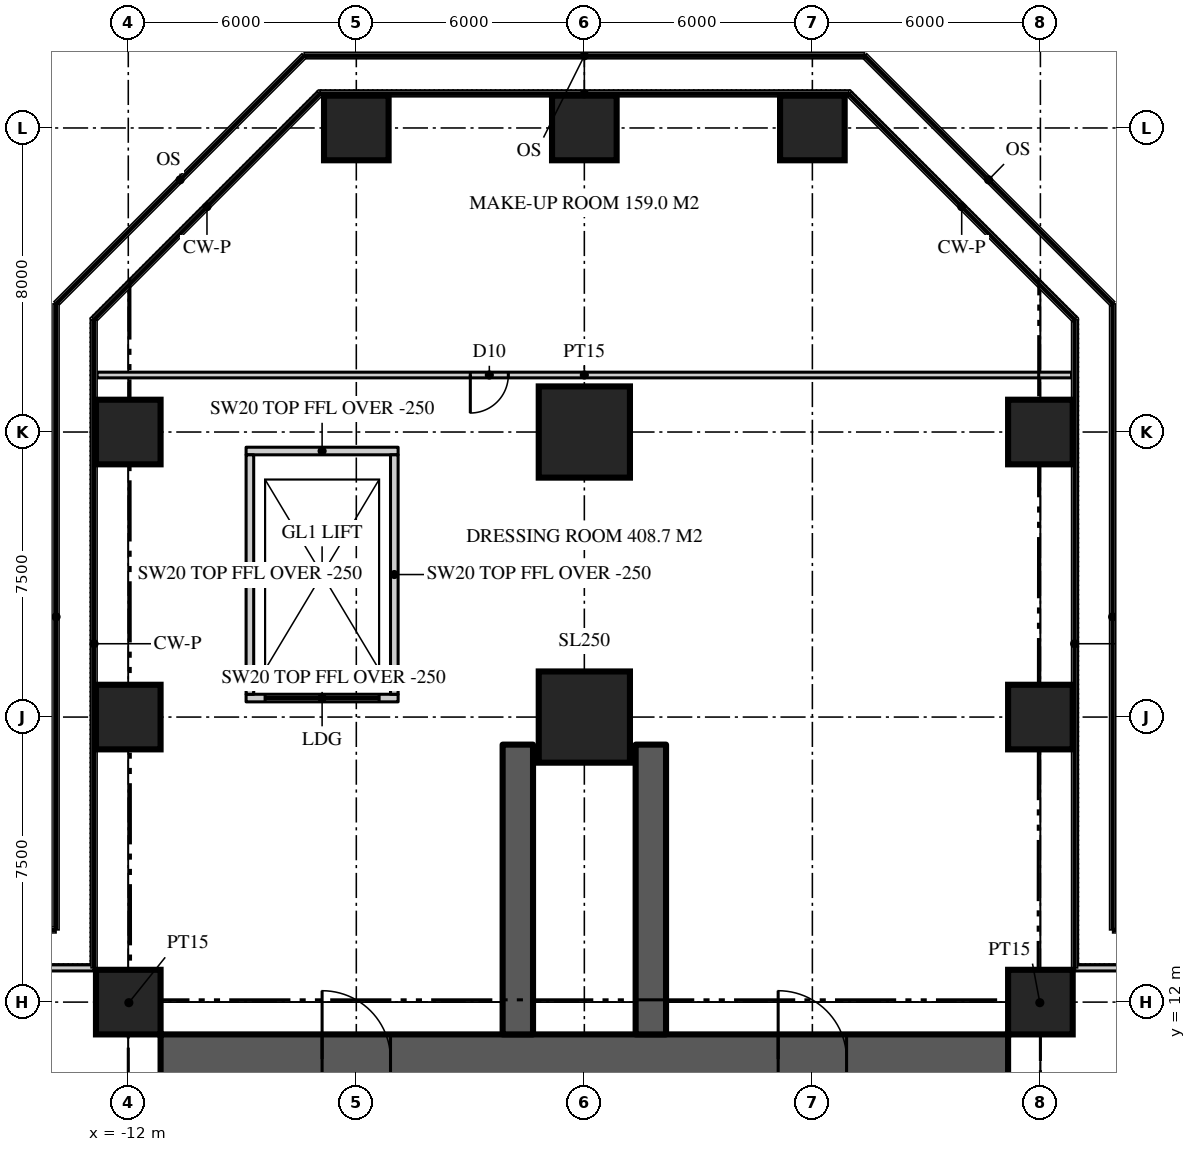
"""IFC4 building model, lengths in metres.
Left out: names, types, materials, properties, quantities, classifications, styles, units other than length and angle.
Written with IfcOpenShell. Run it as: python <this file> out.ifc"""

import sys

from ifc_helpers import new_model, si_unit, direction, frame, frame_2d, origin, origin_2d, place, context, subcontext, project, spatial, rectangle, extrude, element, fill, save


model = new_model("IFC4")
c1 = context("Model", 3, precision=1e-05, world=origin(), true_north=direction((0.0, 1.0)))
c2 = subcontext(c1, "Body", "Model", "MODEL_VIEW")
j1 = project(units=[si_unit("LENGTHUNIT", "METRE"), si_unit("PLANEANGLEUNIT", "RADIAN")], contexts=[c1])
p1 = place(None, origin())
s1 = spatial("IfcSite", under=j1, at=p1, CompositionType="ELEMENT")
p2 = place(p1, origin())
s2 = spatial("IfcBuilding", under=s1, at=p2, CompositionType="ELEMENT")
p3 = place(p2, frame((0.0, 0.0, 15.0)))
s3 = spatial("IfcBuildingStorey", under=s2, at=p3, CompositionType="ELEMENT", Elevation=15.0)
p4 = place(p3, frame((-11.15, 10.5, 0.0), z_axis=(0.0, 0.0, 1.0), x_axis=(1.0, 0.0, 0.0)))
e1 = element("IfcWall", 1, at=p4, inside=s3, PredefinedType="SHEAR", context=c2, shape_type="SweptSolid", body=[
    extrude(rectangle(XDim=22.3, YDim=1.3, at=frame_2d((11.15, 0.0))), origin(), (0.0, 0.0, 1.0), 8.0),
])
p5 = place(p4, frame((4.25, 0.0, 0.0)))
e2 = element("IfcOpeningElement", 2, at=p5, cuts=e1, PredefinedType="OPENING", context=c2, shape_type="SweptSolid", body=[
    extrude(rectangle(XDim=1.8, YDim=2.2, at=frame_2d((0.9, 1.1))), frame((0.0, 0.66, 0.0), z_axis=(0.0, -1.0, 0.0), x_axis=(1.0, 0.0, 0.0)), (0.0, 0.0, 1.0), 1.32),
])
p6 = place(p4, frame((16.25, 0.0, 0.0)))
e3 = element("IfcOpeningElement", 3, at=p6, cuts=e1, PredefinedType="OPENING", context=c2, shape_type="SweptSolid", body=[
    extrude(rectangle(XDim=1.8, YDim=2.2, at=frame_2d((0.9, 1.1))), frame((0.0, 0.66, 0.0), z_axis=(0.0, -1.0, 0.0), x_axis=(1.0, 0.0, 0.0)), (0.0, 0.0, 1.0), 1.32),
])
for number, where, z_axis, x_axis in (
    (4, (1.75, 11.15, 0.0), (0.0, 0.0, 1.0), (0.0, 1.0, 0.0)),
    (5, (-1.75, 11.15, 0.0), (0.0, 0.0, 1.0), (0.0, 1.0, 0.0)),
):
    element("IfcWall", number, at=place(p3, frame(where, z_axis=z_axis, x_axis=x_axis)), inside=s3, PredefinedType="SHEAR", context=c2, shape_type="SweptSolid", body=[
        extrude(rectangle(XDim=7.625, YDim=0.8, at=frame_2d((3.812, 0.0))), origin(), (0.0, 0.0, 1.0), 8.0),
    ])
for number, where, z_axis, x_axis in (
    (6, (-12.0, 12.0, 0.0), (0.0, 0.0, 1.0), (1.0, 0.0, 0.0)),
    (7, (12.0, 12.0, 0.0), (0.0, 0.0, 1.0), (1.0, 0.0, 0.0)),
    (8, (-12.0, 19.5, 0.0), (0.0, 0.0, 1.0), (1.0, 0.0, 0.0)),
):
    element("IfcColumn", number, at=place(p3, frame(where, z_axis=z_axis, x_axis=x_axis)), inside=s3, PredefinedType="COLUMN", context=c2, shape_type="SweptSolid", body=[
        extrude(rectangle(XDim=1.7, YDim=1.7, at=origin_2d()), origin(), (0.0, 0.0, 1.0), 8.0),
    ])
p7 = place(p3, frame((0.0, 19.5, 0.0), z_axis=(0.0, 0.0, 1.0), x_axis=(1.0, 0.0, 0.0)))
e9 = element("IfcColumn", 9, at=p7, inside=s3, PredefinedType="COLUMN", context=c2, shape_type="SweptSolid", body=[
    extrude(rectangle(XDim=2.4, YDim=2.4, at=origin_2d()), origin(), (0.0, 0.0, 1.0), 8.0),
])
for number, where, z_axis, x_axis in (
    (10, (12.0, 19.5, 0.0), (0.0, 0.0, 1.0), (1.0, 0.0, 0.0)),
    (11, (-12.0, 27.0, 0.0), (0.0, 0.0, 1.0), (1.0, 0.0, 0.0)),
):
    element("IfcColumn", number, at=place(p3, frame(where, z_axis=z_axis, x_axis=x_axis)), inside=s3, PredefinedType="COLUMN", context=c2, shape_type="SweptSolid", body=[
        extrude(rectangle(XDim=1.7, YDim=1.7, at=origin_2d()), origin(), (0.0, 0.0, 1.0), 8.0),
    ])
p8 = place(p3, frame((0.0, 27.0, 0.0), z_axis=(0.0, 0.0, 1.0), x_axis=(1.0, 0.0, 0.0)))
e12 = element("IfcColumn", 12, at=p8, inside=s3, PredefinedType="COLUMN", context=c2, shape_type="SweptSolid", body=[
    extrude(rectangle(XDim=2.4, YDim=2.4, at=origin_2d()), origin(), (0.0, 0.0, 1.0), 8.0),
])
for number, where, z_axis, x_axis in (
    (13, (12.0, 27.0, 0.0), (0.0, 0.0, 1.0), (1.0, 0.0, 0.0)),
    (14, (-6.0, 35.0, 0.0), (0.0, 0.0, 1.0), (1.0, 0.0, 0.0)),
    (15, (0.0, 35.0, 0.0), (0.0, 0.0, 1.0), (1.0, 0.0, 0.0)),
    (16, (6.0, 35.0, 0.0), (0.0, 0.0, 1.0), (1.0, 0.0, 0.0)),
):
    element("IfcColumn", number, at=place(p3, frame(where, z_axis=z_axis, x_axis=x_axis)), inside=s3, PredefinedType="COLUMN", context=c2, shape_type="SweptSolid", body=[
        extrude(rectangle(XDim=1.7, YDim=1.7, at=origin_2d()), origin(), (0.0, 0.0, 1.0), 8.0),
    ])
for number, where, z_axis, x_axis in (
    (17, (29.958, 12.9, 0.0), (0.0, 0.0, 1.0), (-1.0, 0.0, 0.0)),
    (18, (-12.9, 12.9, 0.0), (0.0, 0.0, 1.0), (-1.0, 0.0, 0.0)),
):
    element("IfcWall", number, at=place(p3, frame(where, z_axis=z_axis, x_axis=x_axis)), inside=s3, PredefinedType="SOLIDWALL", context=c2, shape_type="SweptSolid", body=[
        extrude(rectangle(XDim=17.059, YDim=0.16, at=frame_2d((8.529, 0.0))), origin(), (0.0, 0.0, 1.0), 7.75),
    ])
p9 = place(p3, frame((12.82, 28.5, 0.0), z_axis=(0.0, 0.0, 1.0), x_axis=(-1.0, 0.0, 0.0)))
e19 = element("IfcWall", 19, at=p9, inside=s3, PredefinedType="PARTITIONING", context=c2, shape_type="SweptSolid", body=[
    extrude(rectangle(XDim=25.64, YDim=0.15, at=frame_2d((12.82, 0.0))), origin(), (0.0, 0.0, 1.0), 7.75),
])
p10 = place(p9, frame((14.82, 0.0, 0.0)))
e20 = element("IfcOpeningElement", 20, at=p10, cuts=e19, PredefinedType="OPENING", context=c2, shape_type="SweptSolid", body=[
    extrude(rectangle(XDim=1.0, YDim=2.2, at=frame_2d((0.5, 1.1))), frame((0.0, 0.085, 0.0), z_axis=(0.0, -1.0, 0.0), x_axis=(1.0, 0.0, 0.0)), (0.0, 0.0, 1.0), 0.17),
])
for number, where, z_axis, x_axis in (
    (21, (11.15, 11.15, 0.0), (0.0, 0.0, 1.0), (0.707, 0.707, 0.0)),
    (22, (-11.15, 11.15, 0.0), (0.0, 0.0, 1.0), (-0.707, 0.707, 0.0)),
):
    element("IfcWall", number, at=place(p3, frame(where, z_axis=z_axis, x_axis=x_axis)), inside=s3, PredefinedType="PARTITIONING", context=c2, shape_type="SweptSolid", body=[
        extrude(rectangle(XDim=2.362, YDim=0.15, at=frame_2d((1.181, 0.0))), origin(), (0.0, 0.0, 1.0), 7.75),
    ])
p11 = place(p3, frame((-4.9, 20.0, 0.0), z_axis=(0.0, 0.0, 1.0), x_axis=(-1.0, 0.0, 0.0)))
e23 = element("IfcWall", 23, at=p11, inside=s3, PredefinedType="SOLIDWALL", context=c2, shape_type="SweptSolid", body=[
    extrude(rectangle(XDim=4.0, YDim=0.2, at=frame_2d((2.0, 0.0))), origin(), (0.0, 0.0, 1.0), 7.75),
])
p12 = place(p11, frame((0.5, 0.0, 0.0)))
e24 = element("IfcOpeningElement", 24, at=p12, cuts=e23, PredefinedType="OPENING", context=c2, shape_type="SweptSolid", body=[
    extrude(rectangle(XDim=3.0, YDim=3.0, at=frame_2d((1.5, 1.5))), frame((0.0, 0.11, 0.0), z_axis=(0.0, -1.0, 0.0), x_axis=(1.0, 0.0, 0.0)), (0.0, 0.0, 1.0), 0.22),
])
p13 = place(p3, frame((-8.9, 26.5, 0.0), z_axis=(0.0, 0.0, 1.0), x_axis=(1.0, 0.0, 0.0)))
e25 = element("IfcWall", 25, at=p13, inside=s3, PredefinedType="SOLIDWALL", context=c2, shape_type="SweptSolid", body=[
    extrude(rectangle(XDim=4.0, YDim=0.2, at=frame_2d((2.0, 0.0))), origin(), (0.0, 0.0, 1.0), 7.75),
])
for number, where, z_axis, x_axis in (
    (26, (-5.0, 20.1, 0.0), (0.0, 0.0, 1.0), (0.0, 1.0, 0.0)),
    (27, (-8.8, 26.4, 0.0), (0.0, 0.0, 1.0), (0.0, -1.0, 0.0)),
):
    element("IfcWall", number, at=place(p3, frame(where, z_axis=z_axis, x_axis=x_axis)), inside=s3, PredefinedType="SOLIDWALL", context=c2, shape_type="SweptSolid", body=[
        extrude(rectangle(XDim=6.3, YDim=0.2, at=frame_2d((3.15, 0.0))), origin(), (0.0, 0.0, 1.0), 7.75),
    ])
p14 = place(p12, origin())
e28 = element("IfcDoor", 28, at=p14, inside=s3, OperationType="SLIDING_TO_LEFT", PredefinedType="DOOR", context=c2, shape_type="SweptSolid", body=[
    extrude(rectangle(XDim=3.0, YDim=3.0, at=frame_2d((1.5, 1.5))), frame((0.0, 0.025, 0.0), z_axis=(0.0, -1.0, 0.0), x_axis=(1.0, 0.0, 0.0)), (0.0, 0.0, 1.0), 0.05),
])
fill(e24, e28)
p15 = place(p5, origin())
e29 = element("IfcDoor", 29, at=p15, inside=s3, OperationType="DOUBLE_DOOR_DOUBLE_SWING", PredefinedType="DOOR", context=c2, shape_type="SweptSolid", body=[
    extrude(rectangle(XDim=1.8, YDim=2.2, at=frame_2d((0.9, 1.1))), frame((0.0, 0.025, 0.0), z_axis=(0.0, -1.0, 0.0), x_axis=(1.0, 0.0, 0.0)), (0.0, 0.0, 1.0), 0.05),
])
fill(e2, e29)
p16 = place(p6, origin())
e30 = element("IfcDoor", 30, at=p16, inside=s3, OperationType="DOUBLE_DOOR_DOUBLE_SWING", PredefinedType="DOOR", context=c2, shape_type="SweptSolid", body=[
    extrude(rectangle(XDim=1.8, YDim=2.2, at=frame_2d((0.9, 1.1))), frame((0.0, 0.025, 0.0), z_axis=(0.0, -1.0, 0.0), x_axis=(1.0, 0.0, 0.0)), (0.0, 0.0, 1.0), 0.05),
])
fill(e3, e30)
p17 = place(p10, origin())
e31 = element("IfcDoor", 31, at=p17, inside=s3, OperationType="SINGLE_SWING_RIGHT", PredefinedType="DOOR", context=c2, shape_type="SweptSolid", body=[
    extrude(rectangle(XDim=1.0, YDim=2.2, at=frame_2d((0.5, 1.1))), frame((0.0, 0.025, 0.0), z_axis=(0.0, -1.0, 0.0), x_axis=(1.0, 0.0, 0.0)), (0.0, 0.0, 1.0), 0.05),
])
fill(e20, e31)
save(model, sys.argv[1])
